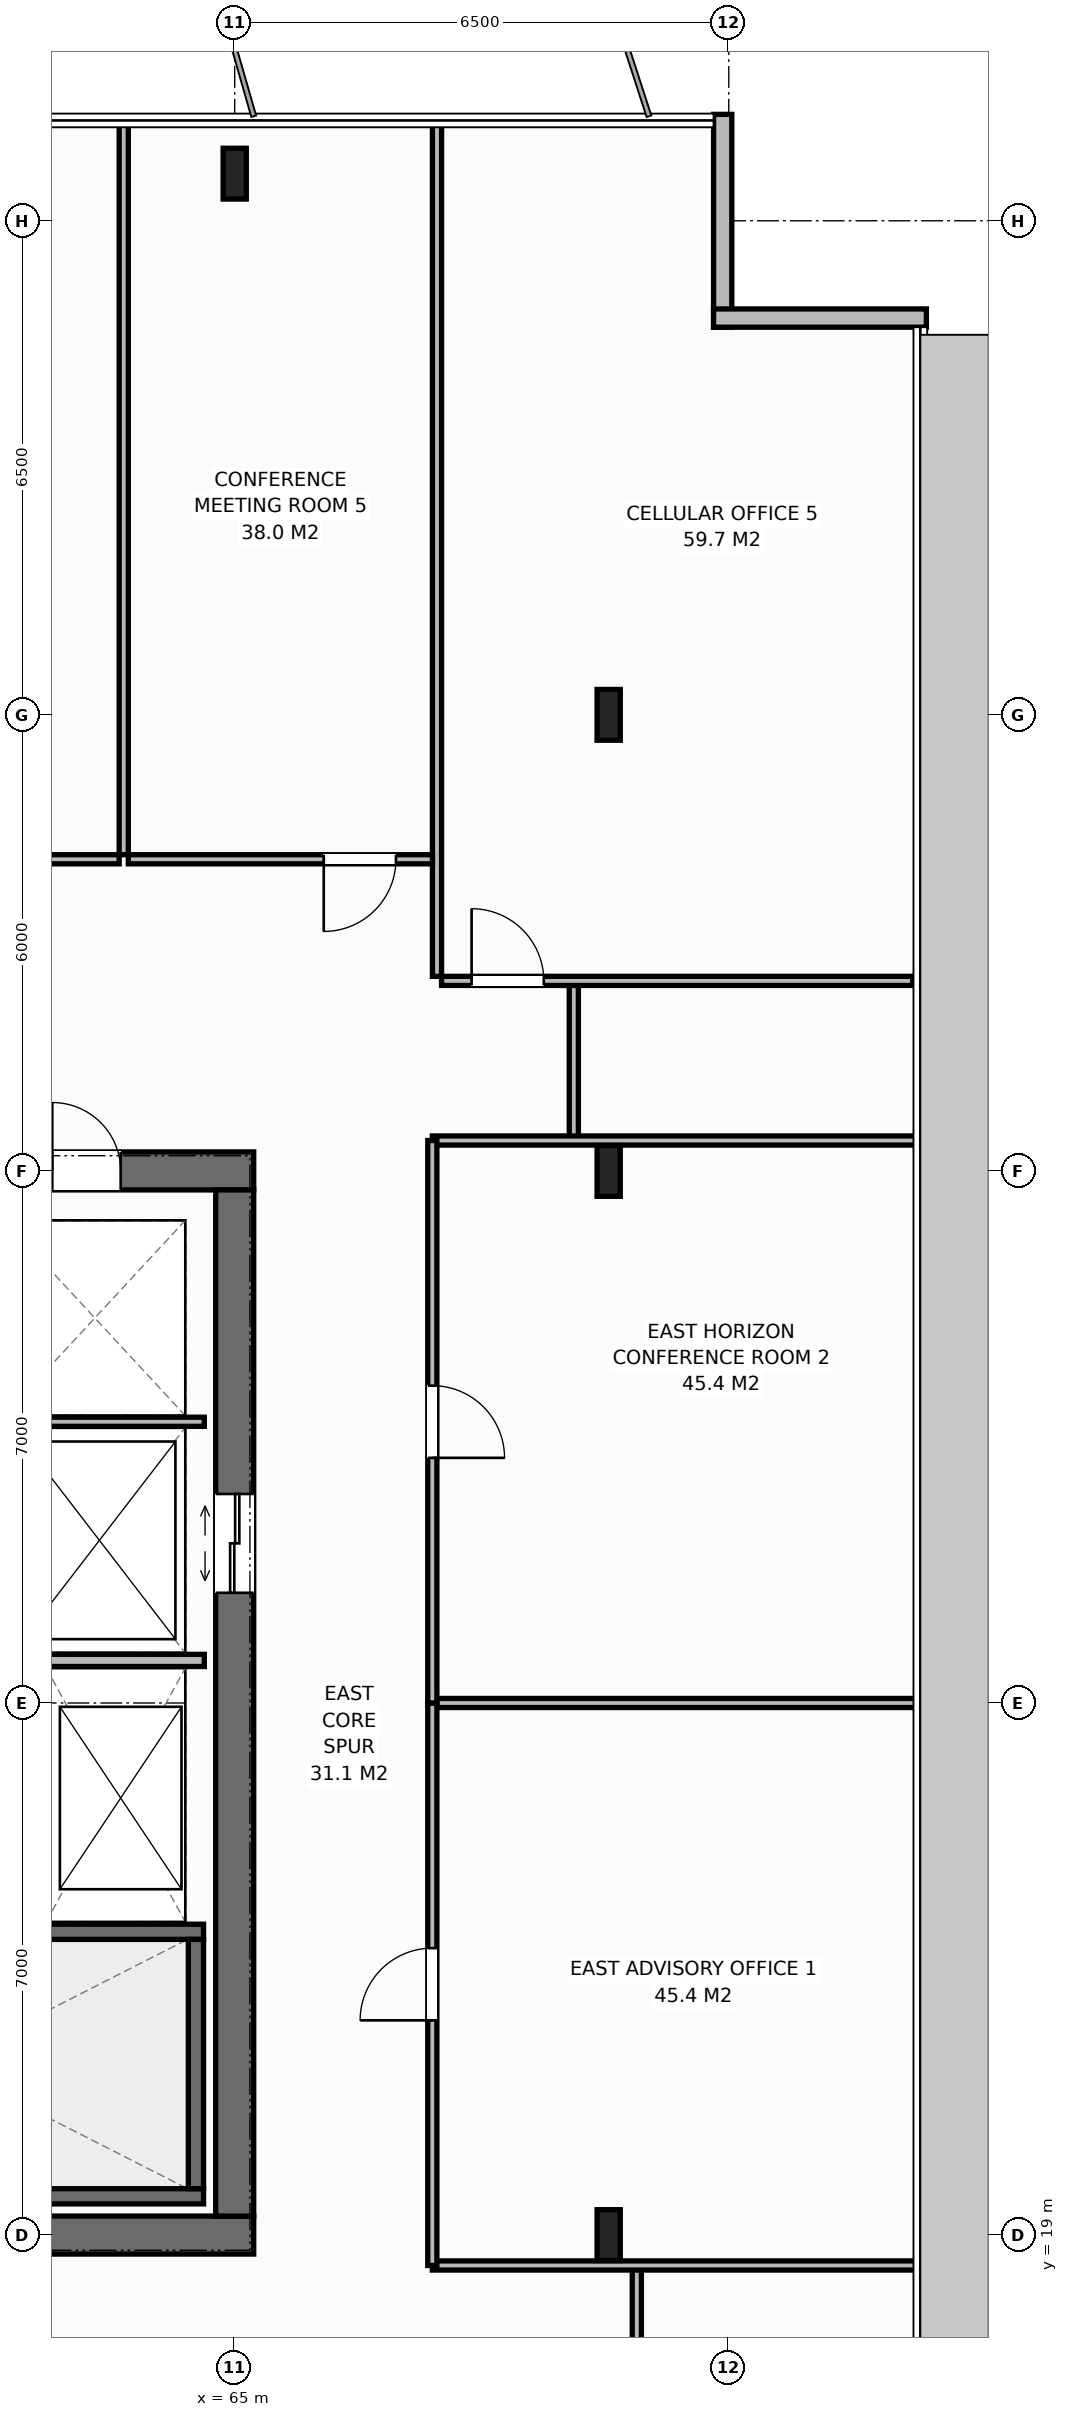
"""IFC4 building model, lengths in metres.
Left out: names, types, materials, properties, quantities, classifications, styles, units other than length and angle.
Written with IfcOpenShell. Run it as: python <this file> out.ifc"""

import sys

from ifc_helpers import new_model, si_unit, direction, frame, frame_2d, origin, origin_2d, place, context, subcontext, project, spatial, rectangle, i_section, extrude, element, fill, save


model = new_model("IFC4")
c1 = context("Model", 3, precision=1e-05, world=origin(), true_north=direction((0.0, 1.0)))
c2 = subcontext(c1, "Body", "Model", "MODEL_VIEW")
j1 = project(units=[si_unit("LENGTHUNIT", "METRE"), si_unit("PLANEANGLEUNIT", "RADIAN")], contexts=[c1])
p1 = place(None, origin())
s1 = spatial("IfcSite", under=j1, at=p1, CompositionType="ELEMENT")
p2 = place(p1, origin())
s2 = spatial("IfcBuilding", under=s1, at=p2, CompositionType="ELEMENT")
p3 = place(p2, frame((0.0, 0.0, 306.4)))
s3 = spatial("IfcBuildingStorey", under=s2, at=p3, CompositionType="ELEMENT", Elevation=306.4)
p4 = place(p3, frame((51.75, 19.0, 0.0), z_axis=(0.0, 0.0, 1.0), x_axis=(1.0, 0.0, 0.0)))
e1 = element("IfcWall", 1, at=p4, inside=s3, PredefinedType="SHEAR", context=c2, shape_type="SweptSolid", body=[
    extrude(rectangle(XDim=13.5, YDim=0.5, at=frame_2d((6.75, 0.0))), origin(), (0.0, 0.0, 1.0), 4.0),
])
p5 = place(p4, frame((2.97, 0.0, 0.0)))
e2 = element("IfcOpeningElement", 2, at=p5, cuts=e1, PredefinedType="OPENING", context=c2, shape_type="SweptSolid", body=[
    extrude(rectangle(XDim=1.4, YDim=2.2, at=frame_2d((0.7, 1.1))), frame((0.0, 0.26, 0.0), z_axis=(0.0, -1.0, 0.0), x_axis=(1.0, 0.0, 0.0)), (0.0, 0.0, 1.0), 0.52),
])
p6 = place(p3, frame((51.75, 33.0, 0.0), z_axis=(0.0, 0.0, 1.0), x_axis=(1.0, 0.0, 0.0)))
e3 = element("IfcWall", 3, at=p6, inside=s3, PredefinedType="SHEAR", context=c2, shape_type="SweptSolid", body=[
    extrude(rectangle(XDim=13.5, YDim=0.5, at=frame_2d((6.75, 0.0))), origin(), (0.0, 0.0, 1.0), 4.0),
])
p7 = place(p6, frame((2.97, 0.0, 0.0)))
e4 = element("IfcOpeningElement", 4, at=p7, cuts=e3, PredefinedType="OPENING", context=c2, shape_type="SweptSolid", body=[
    extrude(rectangle(XDim=1.4, YDim=2.2, at=frame_2d((0.7, 1.1))), frame((0.0, 0.26, 0.0), z_axis=(0.0, -1.0, 0.0), x_axis=(1.0, 0.0, 0.0)), (0.0, 0.0, 1.0), 0.52),
])
p8 = place(p6, frame((10.85, 0.0, 0.0)))
e5 = element("IfcOpeningElement", 5, at=p8, cuts=e3, PredefinedType="OPENING", context=c2, shape_type="SweptSolid", body=[
    extrude(rectangle(XDim=0.9, YDim=2.15, at=frame_2d((0.45, 1.075))), frame((0.0, 0.26, 0.0), z_axis=(0.0, -1.0, 0.0), x_axis=(1.0, 0.0, 0.0)), (0.0, 0.0, 1.0), 0.52),
])
p9 = place(p6, frame((5.8, 0.0, 0.0)))
e6 = element("IfcOpeningElement", 6, at=p9, cuts=e3, PredefinedType="OPENING", context=c2, shape_type="SweptSolid", body=[
    extrude(rectangle(XDim=0.9, YDim=2.15, at=frame_2d((0.45, 1.075))), frame((0.0, 0.26, 0.0), z_axis=(0.0, -1.0, 0.0), x_axis=(1.0, 0.0, 0.0)), (0.0, 0.0, 1.0), 0.52),
])
p10 = place(p6, frame((8.2, 0.0, 0.0)))
e7 = element("IfcOpeningElement", 7, at=p10, cuts=e3, PredefinedType="OPENING", context=c2, shape_type="SweptSolid", body=[
    extrude(rectangle(XDim=0.95, YDim=2.15, at=frame_2d((0.475, 1.075))), frame((0.0, 0.26, 0.0), z_axis=(0.0, -1.0, 0.0), x_axis=(1.0, 0.0, 0.0)), (0.0, 0.0, 1.0), 0.52),
])
p11 = place(p3, frame((65.0, 19.25, 0.0), z_axis=(0.0, 0.0, 1.0), x_axis=(0.0, 1.0, 0.0)))
e8 = element("IfcWall", 8, at=p11, inside=s3, PredefinedType="SHEAR", context=c2, shape_type="SweptSolid", body=[
    extrude(rectangle(XDim=13.5, YDim=0.5, at=frame_2d((6.75, 0.0))), origin(), (0.0, 0.0, 1.0), 4.0),
])
p12 = place(p11, frame((8.2, 0.0, 0.0)))
e9 = element("IfcOpeningElement", 9, at=p12, cuts=e8, PredefinedType="OPENING", context=c2, shape_type="SweptSolid", body=[
    extrude(rectangle(XDim=1.3, YDim=2.2, at=frame_2d((0.65, 1.1))), frame((0.0, 0.26, 0.0), z_axis=(0.0, -1.0, 0.0), x_axis=(1.0, 0.0, 0.0)), (0.0, 0.0, 1.0), 0.52),
])
p13 = place(p3, frame((56.16, 19.51, 0.0), z_axis=(0.0, 0.0, 1.0), x_axis=(1.0, 0.0, 0.0)))
e10 = element("IfcWall", 10, at=p13, inside=s3, PredefinedType="SHEAR", context=c2, shape_type="SweptSolid", body=[
    extrude(rectangle(XDim=8.43, YDim=0.2, at=frame_2d((4.215, 0.0))), origin(), (0.0, 0.0, 1.0), 4.0),
])
p14 = place(p3, frame((56.16, 22.99, 0.0), z_axis=(0.0, 0.0, 1.0), x_axis=(1.0, 0.0, 0.0)))
e11 = element("IfcWall", 11, at=p14, inside=s3, PredefinedType="SHEAR", context=c2, shape_type="SweptSolid", body=[
    extrude(rectangle(XDim=8.43, YDim=0.2, at=frame_2d((4.215, 0.0))), origin(), (0.0, 0.0, 1.0), 4.0),
])
p15 = place(p14, frame((0.45, 0.0, 0.0)))
e12 = element("IfcOpeningElement", 12, at=p15, cuts=e11, PredefinedType="OPENING", context=c2, shape_type="SweptSolid", body=[
    extrude(rectangle(XDim=1.0, YDim=2.15, at=frame_2d((0.5, 1.075))), frame((0.0, 0.11, 0.0), z_axis=(0.0, -1.0, 0.0), x_axis=(1.0, 0.0, 0.0)), (0.0, 0.0, 1.0), 0.22),
])
p16 = place(p3, frame((64.49, 19.61, 0.0), z_axis=(0.0, 0.0, 1.0), x_axis=(0.0, 1.0, 0.0)))
e13 = element("IfcWall", 13, at=p16, inside=s3, PredefinedType="SHEAR", context=c2, shape_type="SweptSolid", body=[
    extrude(rectangle(XDim=3.28, YDim=0.2, at=frame_2d((1.64, 0.0))), origin(), (0.0, 0.0, 1.0), 4.0),
])
for number, where, z_axis, x_axis in (
    (14, (65.0, 46.12, 0.0), (0.0, 0.0, 1.0), (1.0, 0.0, 0.0)),
    (15, (69.92, 19.0, 0.0), (0.0, 0.0, 1.0), (1.0, 0.0, 0.0)),
    (16, (69.92, 33.0, 0.0), (0.0, 0.0, 1.0), (1.0, 0.0, 0.0)),
    (17, (69.92, 39.0, 0.0), (0.0, 0.0, 1.0), (1.0, 0.0, 0.0)),
):
    element("IfcColumn", number, at=place(p3, frame(where, z_axis=z_axis, x_axis=x_axis)), inside=s3, PredefinedType="COLUMN", context=c2, shape_type="SweptSolid", body=[
        extrude(i_section(OverallWidth=0.305, OverallDepth=0.668, WebThickness=0.021, FlangeThickness=0.04, at=origin_2d()), origin(), (0.0, 0.0, 1.0), 4.0),
    ])
p17 = place(p3, frame((71.42, 46.9, 0.0), z_axis=(0.0, 0.0, 1.0), x_axis=(0.0, -1.0, 0.0)))
e18 = element("IfcWall", 18, at=p17, inside=s3, PredefinedType="STANDARD", context=c2, shape_type="SweptSolid", body=[
    extrude(rectangle(XDim=2.8, YDim=0.24, at=frame_2d((1.4, 0.0))), origin(), (0.0, 0.0, 1.0), 3.72),
])
p18 = place(p3, frame((71.3, 44.22, 0.0), z_axis=(0.0, 0.0, 1.0), x_axis=(1.0, 0.0, 0.0)))
e19 = element("IfcWall", 19, at=p18, inside=s3, PredefinedType="STANDARD", context=c2, shape_type="SweptSolid", body=[
    extrude(rectangle(XDim=2.8, YDim=0.24, at=frame_2d((1.4, 0.0))), origin(), (0.0, 0.0, 1.0), 3.72),
])
p19 = place(p3, frame((56.26, 26.56, 0.0), z_axis=(0.0, 0.0, 1.0), x_axis=(1.0, 0.0, 0.0)))
e20 = element("IfcWall", 20, at=p19, inside=s3, PredefinedType="STANDARD", context=c2, shape_type="SweptSolid", body=[
    extrude(rectangle(XDim=8.34, YDim=0.16, at=frame_2d((4.17, 0.0))), origin(), (0.0, 0.0, 1.0), 3.72),
])
p20 = place(p3, frame((61.87, 29.7, 0.0), z_axis=(0.0, 0.0, 1.0), x_axis=(1.0, 0.0, 0.0)))
e21 = element("IfcWall", 21, at=p20, inside=s3, PredefinedType="PARTITIONING", context=c2, shape_type="SweptSolid", body=[
    extrude(rectangle(XDim=2.73, YDim=0.12, at=frame_2d((1.365, 0.0))), origin(), (0.0, 0.0, 1.0), 3.72),
])
for number, where, z_axis, x_axis in (
    (22, (69.461, 33.4, 0.0), (0.0, 0.0, 1.0), (0.0, 1.0, 0.0)),
    (23, (70.29, 16.5, 0.0), (0.0, 0.0, 1.0), (0.0, 1.0, 0.0)),
):
    element("IfcWall", number, at=place(p3, frame(where, z_axis=z_axis, x_axis=x_axis)), inside=s3, PredefinedType="PARTITIONING", context=c2, shape_type="SweptSolid", body=[
        extrude(rectangle(XDim=2.1, YDim=0.12, at=frame_2d((1.05, 0.0))), origin(), (0.0, 0.0, 1.0), 3.72),
    ])
p21 = place(p3, frame((63.54, 37.16, 0.0), z_axis=(0.0, 0.0, 1.0), x_axis=(0.0, 1.0, 0.0)))
e24 = element("IfcWall", 24, at=p21, inside=s3, PredefinedType="PARTITIONING", context=c2, shape_type="SweptSolid", body=[
    extrude(rectangle(XDim=9.72, YDim=0.12, at=frame_2d((4.86, 0.0))), origin(), (0.0, 0.0, 1.0), 3.72),
])
p22 = place(p3, frame((57.342, 37.1, 0.0), z_axis=(0.0, 0.0, 1.0), x_axis=(1.0, 0.0, 0.0)))
e25 = element("IfcWall", 25, at=p22, inside=s3, PredefinedType="PARTITIONING", context=c2, shape_type="SweptSolid", body=[
    extrude(rectangle(XDim=6.138, YDim=0.12, at=frame_2d((3.069, 0.0))), origin(), (0.0, 0.0, 1.0), 3.72),
])
p23 = place(p22, frame((2.594, 0.0, 0.0)))
e26 = element("IfcOpeningElement", 26, at=p23, cuts=e25, PredefinedType="OPENING", context=c2, shape_type="SweptSolid", body=[
    extrude(rectangle(XDim=0.95, YDim=2.15, at=frame_2d((0.475, 1.075))), frame((0.0, 0.07, 0.0), z_axis=(0.0, -1.0, 0.0), x_axis=(1.0, 0.0, 0.0)), (0.0, 0.0, 1.0), 0.14),
])
p24 = place(p3, frame((67.662, 35.56, 0.0), z_axis=(0.0, 0.0, 1.0), x_axis=(0.0, 1.0, 0.0)))
e27 = element("IfcWall", 27, at=p24, inside=s3, PredefinedType="PARTITIONING", context=c2, shape_type="SweptSolid", body=[
    extrude(rectangle(XDim=11.32, YDim=0.12, at=frame_2d((5.66, 0.0))), origin(), (0.0, 0.0, 1.0), 3.72),
])
p25 = place(p3, frame((63.6, 37.1, 0.0), z_axis=(0.0, 0.0, 1.0), x_axis=(1.0, 0.0, 0.0)))
e28 = element("IfcWall", 28, at=p25, inside=s3, PredefinedType="PARTITIONING", context=c2, shape_type="SweptSolid", body=[
    extrude(rectangle(XDim=4.001, YDim=0.12, at=frame_2d((2.001, 0.0))), origin(), (0.0, 0.0, 1.0), 3.72),
])
p26 = place(p25, frame((2.572, 0.0, 0.0)))
e29 = element("IfcOpeningElement", 29, at=p26, cuts=e28, PredefinedType="OPENING", context=c2, shape_type="SweptSolid", body=[
    extrude(rectangle(XDim=0.95, YDim=2.15, at=frame_2d((0.475, 1.075))), frame((0.0, 0.07, 0.0), z_axis=(0.0, -1.0, 0.0), x_axis=(1.0, 0.0, 0.0)), (0.0, 0.0, 1.0), 0.14),
])
p27 = place(p3, frame((67.721, 35.5, 0.0), z_axis=(0.0, 0.0, 1.0), x_axis=(1.0, 0.0, 0.0)))
e30 = element("IfcWall", 30, at=p27, inside=s3, PredefinedType="PARTITIONING", context=c2, shape_type="SweptSolid", body=[
    extrude(rectangle(XDim=6.198, YDim=0.12, at=frame_2d((3.099, 0.0))), origin(), (0.0, 0.0, 1.0), 3.72),
])
p28 = place(p27, frame((0.395, 0.0, 0.0)))
e31 = element("IfcOpeningElement", 31, at=p28, cuts=e30, PredefinedType="OPENING", context=c2, shape_type="SweptSolid", body=[
    extrude(rectangle(XDim=0.95, YDim=2.15, at=frame_2d((0.475, 1.075))), frame((0.0, 0.07, 0.0), z_axis=(0.0, -1.0, 0.0), x_axis=(1.0, 0.0, 0.0)), (0.0, 0.0, 1.0), 0.14),
])
for number, where, z_axis, x_axis in (
    (32, (67.6, 18.6, 0.0), (0.0, 0.0, 1.0), (1.0, 0.0, 0.0)),
    (33, (67.6, 33.4, 0.0), (0.0, 0.0, 1.0), (1.0, 0.0, 0.0)),
    (34, (67.6, 26.0, 0.0), (0.0, 0.0, 1.0), (1.0, 0.0, 0.0)),
):
    element("IfcWall", number, at=place(p3, frame(where, z_axis=z_axis, x_axis=x_axis)), inside=s3, PredefinedType="PARTITIONING", context=c2, shape_type="SweptSolid", body=[
        extrude(rectangle(XDim=6.48, YDim=0.12, at=frame_2d((3.24, 0.0))), origin(), (0.0, 0.0, 1.0), 3.72),
    ])
p29 = place(p3, frame((67.6, 18.6, 0.0), z_axis=(0.0, 0.0, 1.0), x_axis=(0.0, 1.0, 0.0)))
e35 = element("IfcWall", 35, at=p29, inside=s3, PredefinedType="PARTITIONING", context=c2, shape_type="SweptSolid", body=[
    extrude(rectangle(XDim=7.4, YDim=0.12, at=frame_2d((3.7, 0.0))), origin(), (0.0, 0.0, 1.0), 3.72),
])
p30 = place(p29, frame((3.225, 0.0, 0.0)))
e36 = element("IfcOpeningElement", 36, at=p30, cuts=e35, PredefinedType="OPENING", context=c2, shape_type="SweptSolid", body=[
    extrude(rectangle(XDim=0.95, YDim=2.15, at=frame_2d((0.475, 1.075))), frame((0.0, 0.07, 0.0), z_axis=(0.0, -1.0, 0.0), x_axis=(1.0, 0.0, 0.0)), (0.0, 0.0, 1.0), 0.14),
])
p31 = place(p3, frame((67.6, 26.0, 0.0), z_axis=(0.0, 0.0, 1.0), x_axis=(0.0, 1.0, 0.0)))
e37 = element("IfcWall", 37, at=p31, inside=s3, PredefinedType="PARTITIONING", context=c2, shape_type="SweptSolid", body=[
    extrude(rectangle(XDim=7.4, YDim=0.12, at=frame_2d((3.7, 0.0))), origin(), (0.0, 0.0, 1.0), 3.72),
])
p32 = place(p31, frame((3.225, 0.0, 0.0)))
e38 = element("IfcOpeningElement", 38, at=p32, cuts=e37, PredefinedType="OPENING", context=c2, shape_type="SweptSolid", body=[
    extrude(rectangle(XDim=0.95, YDim=2.15, at=frame_2d((0.475, 1.075))), frame((0.0, 0.07, 0.0), z_axis=(0.0, -1.0, 0.0), x_axis=(1.0, 0.0, 0.0)), (0.0, 0.0, 1.0), 0.14),
])
p33 = place(p12, origin())
e39 = element("IfcDoor", 39, at=p33, inside=s3, OperationType="DOUBLE_DOOR_SLIDING", PredefinedType="DOOR", context=c2, shape_type="SweptSolid", body=[
    extrude(rectangle(XDim=1.3, YDim=2.2, at=frame_2d((0.65, 1.1))), frame((0.0, 0.025, 0.0), z_axis=(0.0, -1.0, 0.0), x_axis=(1.0, 0.0, 0.0)), (0.0, 0.0, 1.0), 0.05),
])
fill(e9, e39)
p34 = place(p8, origin())
e40 = element("IfcDoor", 40, at=p34, inside=s3, OperationType="SINGLE_SWING_LEFT", PredefinedType="DOOR", context=c2, shape_type="SweptSolid", body=[
    extrude(rectangle(XDim=0.9, YDim=2.15, at=frame_2d((0.45, 1.075))), frame((0.0, -0.025, 0.0), z_axis=(0.0, -1.0, 0.0), x_axis=(1.0, 0.0, 0.0)), (0.0, 0.0, 1.0), 0.05),
])
fill(e5, e40)
p35 = place(p26, origin())
e41 = element("IfcDoor", 41, at=p35, inside=s3, OperationType="SINGLE_SWING_RIGHT", PredefinedType="DOOR", context=c2, shape_type="SweptSolid", body=[
    extrude(rectangle(XDim=0.95, YDim=2.15, at=frame_2d((0.475, 1.075))), frame((0.0, 0.025, 0.0), z_axis=(0.0, -1.0, 0.0), x_axis=(1.0, 0.0, 0.0)), (0.0, 0.0, 1.0), 0.05),
])
fill(e29, e41)
p36 = place(p28, origin())
e42 = element("IfcDoor", 42, at=p36, inside=s3, OperationType="SINGLE_SWING_LEFT", PredefinedType="DOOR", context=c2, shape_type="SweptSolid", body=[
    extrude(rectangle(XDim=0.95, YDim=2.15, at=frame_2d((0.475, 1.075))), frame((0.0, 0.025, 0.0), z_axis=(0.0, -1.0, 0.0), x_axis=(1.0, 0.0, 0.0)), (0.0, 0.0, 1.0), 0.05),
])
fill(e31, e42)
p37 = place(p30, origin())
e43 = element("IfcDoor", 43, at=p37, inside=s3, OperationType="SINGLE_SWING_LEFT", PredefinedType="DOOR", context=c2, shape_type="SweptSolid", body=[
    extrude(rectangle(XDim=0.95, YDim=2.15, at=frame_2d((0.475, 1.075))), frame((0.0, 0.025, 0.0), z_axis=(0.0, -1.0, 0.0), x_axis=(1.0, 0.0, 0.0)), (0.0, 0.0, 1.0), 0.05),
])
fill(e36, e43)
p38 = place(p32, origin())
e44 = element("IfcDoor", 44, at=p38, inside=s3, OperationType="SINGLE_SWING_RIGHT", PredefinedType="DOOR", context=c2, shape_type="SweptSolid", body=[
    extrude(rectangle(XDim=0.95, YDim=2.15, at=frame_2d((0.475, 1.075))), frame((0.0, 0.025, 0.0), z_axis=(0.0, -1.0, 0.0), x_axis=(1.0, 0.0, 0.0)), (0.0, 0.0, 1.0), 0.05),
])
fill(e38, e44)
save(model, sys.argv[1])
